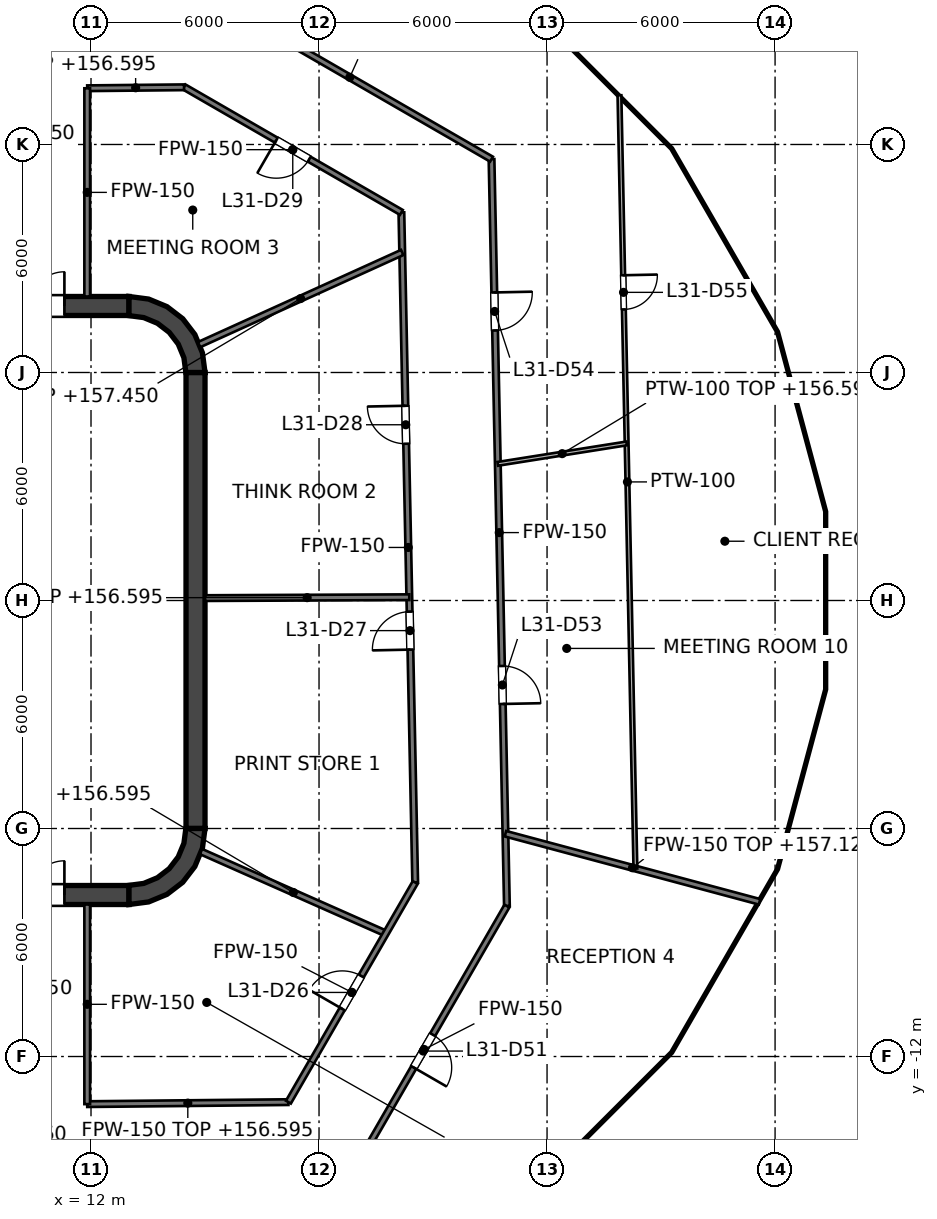
"""IFC4 building model, lengths in metres.
Left out: names, types, materials, properties, quantities, classifications, styles, units other than length and angle.
Written with IfcOpenShell. Run it as: python <this file> out.ifc"""

import sys

from ifc_helpers import new_model, si_unit, direction, frame, frame_2d, origin, place, context, subcontext, project, spatial, polyline, rectangle, outline, extrude, element, fill, save


model = new_model("IFC4")
c1 = context("Model", 3, precision=1e-05, world=origin(), true_north=direction((0.0, 1.0)))
c2 = subcontext(c1, "Body", "Model", "MODEL_VIEW")
j1 = project(units=[si_unit("LENGTHUNIT", "METRE"), si_unit("PLANEANGLEUNIT", "RADIAN")], contexts=[c1])
p1 = place(None, origin())
s1 = spatial("IfcSite", under=j1, at=p1, CompositionType="ELEMENT")
p2 = place(p1, origin())
s2 = spatial("IfcBuilding", under=s1, at=p2, CompositionType="ELEMENT")
p3 = place(p2, frame((0.0, 0.0, 153.6)))
s3 = spatial("IfcBuildingStorey", under=s2, at=p3, CompositionType="ELEMENT", Elevation=153.6)
p4 = place(p3, frame((-13.0, 7.75, 0.0), z_axis=(0.0, 0.0, 1.0), x_axis=(1.0, 0.0, 0.0)))
e1 = element("IfcWall", 1, at=p4, inside=s3, PredefinedType="SHEAR", context=c2, shape_type="SweptSolid", body=[
    extrude(rectangle(XDim=26.0, YDim=0.5, at=frame_2d((13.0, 0.0))), origin(), (0.0, 0.0, 1.0), 4.0),
])
p5 = place(p4, frame((1.7, 0.0, 0.0)))
e2 = element("IfcOpeningElement", 2, at=p5, cuts=e1, PredefinedType="OPENING", context=c2, shape_type="SweptSolid", body=[
    extrude(rectangle(XDim=1.8, YDim=2.1, at=frame_2d((0.9, 1.05))), frame((0.0, 0.25, 0.0), z_axis=(0.0, -1.0, 0.0), x_axis=(1.0, 0.0, 0.0)), (0.0, 0.0, 1.0), 0.5),
])
p6 = place(p4, frame((22.5, 0.0, 0.0)))
e3 = element("IfcOpeningElement", 3, at=p6, cuts=e1, PredefinedType="OPENING", context=c2, shape_type="SweptSolid", body=[
    extrude(rectangle(XDim=1.8, YDim=2.1, at=frame_2d((0.9, 1.05))), frame((0.0, 0.25, 0.0), z_axis=(0.0, -1.0, 0.0), x_axis=(1.0, 0.0, 0.0)), (0.0, 0.0, 1.0), 0.5),
])
p7 = place(p3, frame((-13.0, -7.75, 0.0), z_axis=(0.0, 0.0, 1.0), x_axis=(1.0, 0.0, 0.0)))
e4 = element("IfcWall", 4, at=p7, inside=s3, PredefinedType="SHEAR", context=c2, shape_type="SweptSolid", body=[
    extrude(rectangle(XDim=26.0, YDim=0.5, at=frame_2d((13.0, 0.0))), origin(), (0.0, 0.0, 1.0), 4.0),
])
p8 = place(p7, frame((1.7, 0.0, 0.0)))
e5 = element("IfcOpeningElement", 5, at=p8, cuts=e4, PredefinedType="OPENING", context=c2, shape_type="SweptSolid", body=[
    extrude(rectangle(XDim=1.8, YDim=2.1, at=frame_2d((0.9, 1.05))), frame((0.0, 0.25, 0.0), z_axis=(0.0, -1.0, 0.0), x_axis=(1.0, 0.0, 0.0)), (0.0, 0.0, 1.0), 0.5),
])
p9 = place(p7, frame((22.5, 0.0, 0.0)))
e6 = element("IfcOpeningElement", 6, at=p9, cuts=e4, PredefinedType="OPENING", context=c2, shape_type="SweptSolid", body=[
    extrude(rectangle(XDim=1.8, YDim=2.1, at=frame_2d((0.9, 1.05))), frame((0.0, 0.25, 0.0), z_axis=(0.0, -1.0, 0.0), x_axis=(1.0, 0.0, 0.0)), (0.0, 0.0, 1.0), 0.5),
])
p10 = place(p3, frame((14.75, -6.0, 0.0), z_axis=(0.0, 0.0, 1.0), x_axis=(0.0, 1.0, 0.0)))
e7 = element("IfcWall", 7, at=p10, inside=s3, PredefinedType="SHEAR", context=c2, shape_type="SweptSolid", body=[
    extrude(rectangle(XDim=12.0, YDim=0.5, at=frame_2d((6.0, 0.0))), origin(), (0.0, 0.0, 1.0), 4.0),
])
p11 = place(p3, origin())
e8 = element("IfcWall", 8, at=p11, inside=s3, PredefinedType="SHEAR", context=c2, shape_type="SweptSolid", body=[
    extrude(outline(polyline([(13.0, 8.0), (13.0, 7.496), (13.387, 7.445), (13.748, 7.295), (14.058, 7.058), (14.295, 6.748), (14.445, 6.387), (14.496, 6.0), (15.0, 6.0), (14.932, 6.518), (14.732, 7.0), (14.414, 7.414), (14.0, 7.732), (13.518, 7.932), (13.0, 8.0)])), origin(), (0.0, 0.0, 1.0), 4.0),
])
e9 = element("IfcWall", 9, at=p11, inside=s3, PredefinedType="SHEAR", context=c2, shape_type="SweptSolid", body=[
    extrude(outline(polyline([(15.0, -6.0), (14.496, -6.0), (14.445, -6.387), (14.295, -6.748), (14.058, -7.058), (13.748, -7.295), (13.387, -7.445), (13.0, -7.496), (13.0, -8.0), (13.518, -7.932), (14.0, -7.732), (14.414, -7.414), (14.732, -7.0), (14.932, -6.518), (15.0, -6.0)])), origin(), (0.0, 0.0, 1.0), 4.0),
])
p12 = place(p3, frame((11.8, -7.5, 0.0), z_axis=(0.0, 0.0, 1.0), x_axis=(0.0, 1.0, 0.0)))
e10 = element("IfcWall", 10, at=p12, inside=s3, PredefinedType="SOLIDWALL", context=c2, shape_type="SweptSolid", body=[
    extrude(rectangle(XDim=15.0, YDim=0.4, at=frame_2d((7.5, 0.0))), origin(), (0.0, 0.0, 1.0), 3.85),
])
p13 = place(p12, frame((11.3, 0.0, 0.0)))
e11 = element("IfcOpeningElement", 11, at=p13, cuts=e10, PredefinedType="OPENING", context=c2, shape_type="SweptSolid", body=[
    extrude(rectangle(XDim=1.1, YDim=2.1, at=frame_2d((0.55, 1.05))), frame((0.0, 0.2, 0.0), z_axis=(0.0, -1.0, 0.0), x_axis=(1.0, 0.0, 0.0)), (0.0, 0.0, 1.0), 0.4),
])
p14 = place(p12, frame((8.4, 0.0, 0.0)))
e12 = element("IfcOpeningElement", 12, at=p14, cuts=e10, PredefinedType="OPENING", context=c2, shape_type="SweptSolid", body=[
    extrude(rectangle(XDim=1.1, YDim=2.1, at=frame_2d((0.55, 1.05))), frame((0.0, 0.2, 0.0), z_axis=(0.0, -1.0, 0.0), x_axis=(1.0, 0.0, 0.0)), (0.0, 0.0, 1.0), 0.4),
])
p15 = place(p12, frame((5.5, 0.0, 0.0)))
e13 = element("IfcOpeningElement", 13, at=p15, cuts=e10, PredefinedType="OPENING", context=c2, shape_type="SweptSolid", body=[
    extrude(rectangle(XDim=1.1, YDim=2.1, at=frame_2d((0.55, 1.05))), frame((0.0, 0.2, 0.0), z_axis=(0.0, -1.0, 0.0), x_axis=(1.0, 0.0, 0.0)), (0.0, 0.0, 1.0), 0.4),
])
p16 = place(p12, frame((13.697, 0.0, 0.0)))
e14 = element("IfcOpeningElement", 14, at=p16, cuts=e10, PredefinedType="OPENING", context=c2, shape_type="SweptSolid", body=[
    extrude(rectangle(XDim=0.9, YDim=2.1, at=frame_2d((0.45, 1.05))), frame((0.0, 0.2, 0.0), z_axis=(0.0, -1.0, 0.0), x_axis=(1.0, 0.0, 0.0)), (0.0, 0.0, 1.0), 0.4),
])
p17 = place(p12, frame((0.403, 0.0, 0.0)))
e15 = element("IfcOpeningElement", 15, at=p17, cuts=e10, PredefinedType="OPENING", context=c2, shape_type="SweptSolid", body=[
    extrude(rectangle(XDim=0.9, YDim=2.1, at=frame_2d((0.45, 1.05))), frame((0.0, 0.2, 0.0), z_axis=(0.0, -1.0, 0.0), x_axis=(1.0, 0.0, 0.0)), (0.0, 0.0, 1.0), 0.4),
])
e16 = element("IfcWall", 16, at=p11, inside=s3, PredefinedType="SOLIDWALL", context=c2, shape_type="SweptSolid", body=[
    extrude(outline(polyline([(12.0, -5.675), (12.0, -5.925), (14.25, -5.925), (14.5, -5.925), (14.5, -5.675), (14.5, -3.025), (14.5, -2.775), (14.5, -0.125), (14.5, 0.125), (14.5, 2.775), (14.5, 3.025), (14.5, 5.675), (14.5, 5.925), (14.25, 5.925), (12.0, 5.925), (12.0, 5.675), (14.25, 5.675), (14.25, 3.025), (12.0, 3.025), (12.0, 2.775), (14.25, 2.775), (14.25, 0.125), (12.0, 0.125), (12.0, -0.125), (14.25, -0.125), (14.25, -2.775), (12.0, -2.775), (12.0, -3.025), (14.25, -3.025), (14.25, -5.675), (12.0, -5.675)])), origin(), (0.0, 0.0, 1.0), 3.85),
])
p18 = place(p3, frame((20.167, 10.213, 0.0), z_axis=(0.0, 0.0, 1.0), x_axis=(0.020610894613, -0.999787572949, 0.0)))
e17 = element("IfcWall", 17, at=p18, inside=s3, PredefinedType="PARTITIONING", context=c2, shape_type="SweptSolid", body=[
    extrude(rectangle(XDim=17.637, YDim=0.15, at=frame_2d((8.819, 0.0))), origin(), (0.0, 0.0, 1.0), 2.927),
])
p19 = place(p18, frame((10.508, 0.0, 0.0)))
e18 = element("IfcOpeningElement", 18, at=p19, cuts=e17, PredefinedType="OPENING", context=c2, shape_type="SweptSolid", body=[
    extrude(rectangle(XDim=1.0, YDim=2.1, at=frame_2d((0.5, 1.05))), frame((0.0, 0.075, 0.0), z_axis=(0.0, -1.0, 0.0), x_axis=(1.0, 0.0, 0.0)), (0.0, 0.0, 1.0), 0.15),
])
p20 = place(p18, frame((5.09, 0.0, 0.0)))
e19 = element("IfcOpeningElement", 19, at=p20, cuts=e17, PredefinedType="OPENING", context=c2, shape_type="SweptSolid", body=[
    extrude(rectangle(XDim=1.0, YDim=2.1, at=frame_2d((0.5, 1.05))), frame((0.0, 0.075, 0.0), z_axis=(0.0, -1.0, 0.0), x_axis=(1.0, 0.0, 0.0)), (0.0, 0.0, 1.0), 0.15),
])
p21 = place(p3, frame((22.539, 11.615, 0.0), z_axis=(0.0, 0.0, 1.0), x_axis=(0.020601506683, -0.99978776644, 0.0)))
e20 = element("IfcWall", 20, at=p21, inside=s3, PredefinedType="PARTITIONING", context=c2, shape_type="SweptSolid", body=[
    extrude(rectangle(XDim=19.66, YDim=0.15, at=frame_2d((9.83, 0.0))), origin(), (0.0, 0.0, 1.0), 2.927),
])
p22 = place(p21, frame((13.341, 0.0, 0.0)))
e21 = element("IfcOpeningElement", 21, at=p22, cuts=e20, PredefinedType="OPENING", context=c2, shape_type="SweptSolid", body=[
    extrude(rectangle(XDim=1.0, YDim=2.1, at=frame_2d((0.5, 1.05))), frame((0.0, 0.075, 0.0), z_axis=(0.0, -1.0, 0.0), x_axis=(1.0, 0.0, 0.0)), (0.0, 0.0, 1.0), 0.15),
])
p23 = place(p21, frame((3.51, 0.0, 0.0)))
e22 = element("IfcOpeningElement", 22, at=p23, cuts=e20, PredefinedType="OPENING", context=c2, shape_type="SweptSolid", body=[
    extrude(rectangle(XDim=1.0, YDim=2.1, at=frame_2d((0.5, 1.05))), frame((0.0, 0.075, 0.0), z_axis=(0.0, -1.0, 0.0), x_axis=(1.0, 0.0, 0.0)), (0.0, 0.0, 1.0), 0.15),
])
p24 = place(p3, frame((14.448, 13.515, 0.0), z_axis=(0.0, 0.0, 1.0), x_axis=(0.865975016585, -0.500087263036, 0.0)))
e23 = element("IfcWall", 23, at=p24, inside=s3, PredefinedType="PARTITIONING", context=c2, shape_type="SweptSolid", body=[
    extrude(rectangle(XDim=6.604, YDim=0.15, at=frame_2d((3.302, 0.0))), origin(), (0.0, 0.0, 1.0), 2.927),
])
p25 = place(p24, frame((2.804, 0.0, 0.0)))
e24 = element("IfcOpeningElement", 24, at=p25, cuts=e23, PredefinedType="OPENING", context=c2, shape_type="SweptSolid", body=[
    extrude(rectangle(XDim=1.0, YDim=2.1, at=frame_2d((0.5, 1.05))), frame((0.0, 0.075, 0.0), z_axis=(0.0, -1.0, 0.0), x_axis=(1.0, 0.0, 0.0)), (0.0, 0.0, 1.0), 0.15),
])
p26 = place(p3, frame((15.08, 15.921, 0.0), z_axis=(0.0, 0.0, 1.0), x_axis=(0.865982112089, -0.50007497592, 0.0)))
e25 = element("IfcWall", 25, at=p26, inside=s3, PredefinedType="PARTITIONING", context=c2, shape_type="SweptSolid", body=[
    extrude(rectangle(XDim=8.613, YDim=0.15, at=frame_2d((4.306, 0.0))), origin(), (0.0, 0.0, 1.0), 2.927),
])
p27 = place(p3, frame((14.895, -6.607, 0.0), z_axis=(0.0, 0.0, 1.0), x_axis=(0.914233271379, -0.405188259337, 0.0)))
e26 = element("IfcWall", 26, at=p27, inside=s3, PredefinedType="PARTITIONING", context=c2, shape_type="SweptSolid", body=[
    extrude(rectangle(XDim=5.317, YDim=0.15, at=frame_2d((2.659, 0.0))), origin(), (0.0, 0.0, 1.0), 2.995),
])
p28 = place(p3, frame((22.905, -6.137, 0.0), z_axis=(0.0, 0.0, 1.0), x_axis=(0.965908688021, -0.25888299752, 0.0)))
e27 = element("IfcWall", 27, at=p28, inside=s3, PredefinedType="PARTITIONING", context=c2, shape_type="SweptSolid", body=[
    extrude(rectangle(XDim=6.922, YDim=0.15, at=frame_2d((3.461, 0.0))), origin(), (0.0, 0.0, 1.0), 3.527),
])
p29 = place(p3, frame((15.0, 0.063, 0.0), z_axis=(0.0, 0.0, 1.0), x_axis=(0.999990294223, 0.004405843865, 0.0)))
e28 = element("IfcWall", 28, at=p29, inside=s3, PredefinedType="PARTITIONING", context=c2, shape_type="SweptSolid", body=[
    extrude(rectangle(XDim=5.375, YDim=0.15, at=frame_2d((2.688, 0.0))), origin(), (0.0, 0.0, 1.0), 2.995),
])
p30 = place(p3, frame((11.9, -13.253, 0.0), z_axis=(0.0, 0.0, 1.0), x_axis=(0.999950853109, 0.009914200296, 0.0)))
e29 = element("IfcWall", 29, at=p30, inside=s3, PredefinedType="PARTITIONING", context=c2, shape_type="SweptSolid", body=[
    extrude(rectangle(XDim=5.294, YDim=0.15, at=frame_2d((2.647, 0.0))), origin(), (0.0, 0.0, 1.0), 2.995),
])
p31 = place(p3, frame((11.9, 13.48, 0.0), z_axis=(0.0, 0.0, 1.0), x_axis=(0.999950357576, 0.009964054536, 0.0)))
e30 = element("IfcWall", 30, at=p31, inside=s3, PredefinedType="PARTITIONING", context=c2, shape_type="SweptSolid", body=[
    extrude(rectangle(XDim=2.548, YDim=0.15, at=frame_2d((1.274, 0.0))), origin(), (0.0, 0.0, 1.0), 2.995),
])
p32 = place(p3, frame((14.843, 6.733, 0.0), z_axis=(0.0, 0.0, 1.0), x_axis=(0.910628361306, 0.413226315214, 0.0)))
e31 = element("IfcWall", 31, at=p32, inside=s3, PredefinedType="PARTITIONING", context=c2, shape_type="SweptSolid", body=[
    extrude(rectangle(XDim=5.87, YDim=0.15, at=frame_2d((2.935, 0.0))), origin(), (0.0, 0.0, 1.0), 3.85),
])
p33 = place(p3, frame((18.587, -15.587, 0.0), z_axis=(0.0, 0.0, 1.0), x_axis=(0.500005419212, 0.866022274979, 0.0)))
e32 = element("IfcWall", 32, at=p33, inside=s3, PredefinedType="PARTITIONING", context=c2, shape_type="SweptSolid", body=[
    extrude(rectangle(XDim=8.713, YDim=0.15, at=frame_2d((4.357, 0.0))), origin(), (0.0, 0.0, 1.0), 2.927),
])
p34 = place(p33, frame((3.808, 0.0, 0.0)))
e33 = element("IfcOpeningElement", 33, at=p34, cuts=e32, PredefinedType="OPENING", context=c2, shape_type="SweptSolid", body=[
    extrude(rectangle(XDim=1.0, YDim=2.1, at=frame_2d((0.5, 1.05))), frame((0.0, 0.075, 0.0), z_axis=(0.0, -1.0, 0.0), x_axis=(1.0, 0.0, 0.0)), (0.0, 0.0, 1.0), 0.15),
])
p35 = place(p3, frame((17.194, -13.201, 0.0), z_axis=(0.0, 0.0, 1.0), x_axis=(0.499983182885, 0.866035112932, 0.0)))
e34 = element("IfcWall", 34, at=p35, inside=s3, PredefinedType="PARTITIONING", context=c2, shape_type="SweptSolid", body=[
    extrude(rectangle(XDim=6.674, YDim=0.15, at=frame_2d((3.337, 0.0))), origin(), (0.0, 0.0, 1.0), 2.927),
])
p36 = place(p35, frame((2.834, 0.0, 0.0)))
e35 = element("IfcOpeningElement", 35, at=p36, cuts=e34, PredefinedType="OPENING", context=c2, shape_type="SweptSolid", body=[
    extrude(rectangle(XDim=1.0, YDim=2.1, at=frame_2d((0.5, 1.05))), frame((0.0, 0.075, 0.0), z_axis=(0.0, -1.0, 0.0), x_axis=(1.0, 0.0, 0.0)), (0.0, 0.0, 1.0), 0.15),
])
p37 = place(p3, frame((11.9, -13.253, 0.0), z_axis=(0.0, 0.0, 1.0), x_axis=(0.0, 1.0, 0.0)))
e36 = element("IfcWall", 36, at=p37, inside=s3, PredefinedType="PARTITIONING", context=c2, shape_type="SweptSolid", body=[
    extrude(rectangle(XDim=5.253, YDim=0.15, at=frame_2d((2.626, 0.0))), origin(), (0.0, 0.0, 1.0), 2.927),
])
p38 = place(p3, frame((11.9, 8.0, 0.0), z_axis=(0.0, 0.0, 1.0), x_axis=(0.0, 1.0, 0.0)))
e37 = element("IfcWall", 37, at=p38, inside=s3, PredefinedType="PARTITIONING", context=c2, shape_type="SweptSolid", body=[
    extrude(rectangle(XDim=5.479, YDim=0.15, at=frame_2d((2.74, 0.0))), origin(), (0.0, 0.0, 1.0), 2.927),
])
p39 = place(p3, frame((25.905, 13.295, 0.0), z_axis=(0.0, 0.0, 1.0), x_axis=(0.020631727872, -0.999787143249, 0.0)))
e38 = element("IfcWall", 38, at=p39, inside=s3, PredefinedType="PARTITIONING", context=c2, shape_type="SweptSolid", body=[
    extrude(rectangle(XDim=20.353, YDim=0.1, at=frame_2d((10.177, 0.0))), origin(), (0.0, 0.0, 1.0), 2.927),
])
p40 = place(p39, frame((4.737, 0.0, 0.0)))
e39 = element("IfcOpeningElement", 39, at=p40, cuts=e38, PredefinedType="OPENING", context=c2, shape_type="SweptSolid", body=[
    extrude(rectangle(XDim=0.9, YDim=2.1, at=frame_2d((0.45, 1.05))), frame((0.0, 0.05, 0.0), z_axis=(0.0, -1.0, 0.0), x_axis=(1.0, 0.0, 0.0)), (0.0, 0.0, 1.0), 0.1),
])
p41 = place(p3, frame((22.704, 3.596, 0.0), z_axis=(0.0, 0.0, 1.0), x_axis=(0.987679194201, 0.156492202178, 0.0)))
e40 = element("IfcWall", 40, at=p41, inside=s3, PredefinedType="PARTITIONING", context=c2, shape_type="SweptSolid", body=[
    extrude(rectangle(XDim=3.432, YDim=0.1, at=frame_2d((1.716, 0.0))), origin(), (0.0, 0.0, 1.0), 2.995),
])
p42 = place(p13, origin())
e41 = element("IfcDoor", 41, at=p42, inside=s3, OperationType="DOUBLE_DOOR_SLIDING", PredefinedType="DOOR", context=c2, shape_type="SweptSolid", body=[
    extrude(rectangle(XDim=1.1, YDim=2.1, at=frame_2d((0.55, 1.05))), frame((0.0, 0.025, 0.0), z_axis=(0.0, -1.0, 0.0), x_axis=(1.0, 0.0, 0.0)), (0.0, 0.0, 1.0), 0.05),
])
fill(e11, e41)
p43 = place(p14, origin())
e42 = element("IfcDoor", 42, at=p43, inside=s3, OperationType="DOUBLE_DOOR_SLIDING", PredefinedType="DOOR", context=c2, shape_type="SweptSolid", body=[
    extrude(rectangle(XDim=1.1, YDim=2.1, at=frame_2d((0.55, 1.05))), frame((0.0, 0.025, 0.0), z_axis=(0.0, -1.0, 0.0), x_axis=(1.0, 0.0, 0.0)), (0.0, 0.0, 1.0), 0.05),
])
fill(e12, e42)
p44 = place(p15, origin())
e43 = element("IfcDoor", 43, at=p44, inside=s3, OperationType="DOUBLE_DOOR_SLIDING", PredefinedType="DOOR", context=c2, shape_type="SweptSolid", body=[
    extrude(rectangle(XDim=1.1, YDim=2.1, at=frame_2d((0.55, 1.05))), frame((0.0, 0.025, 0.0), z_axis=(0.0, -1.0, 0.0), x_axis=(1.0, 0.0, 0.0)), (0.0, 0.0, 1.0), 0.05),
])
fill(e13, e43)
p45 = place(p16, origin())
e44 = element("IfcDoor", 44, at=p45, inside=s3, OperationType="SINGLE_SWING_RIGHT", PredefinedType="DOOR", context=c2, shape_type="SweptSolid", body=[
    extrude(rectangle(XDim=0.9, YDim=2.1, at=frame_2d((0.45, 1.05))), frame((0.0, 0.025, 0.0), z_axis=(0.0, -1.0, 0.0), x_axis=(1.0, 0.0, 0.0)), (0.0, 0.0, 1.0), 0.05),
])
fill(e14, e44)
p46 = place(p17, origin())
e45 = element("IfcDoor", 45, at=p46, inside=s3, OperationType="SINGLE_SWING_RIGHT", PredefinedType="DOOR", context=c2, shape_type="SweptSolid", body=[
    extrude(rectangle(XDim=0.9, YDim=2.1, at=frame_2d((0.45, 1.05))), frame((0.0, 0.025, 0.0), z_axis=(0.0, -1.0, 0.0), x_axis=(1.0, 0.0, 0.0)), (0.0, 0.0, 1.0), 0.05),
])
fill(e15, e45)
p47 = place(p6, origin())
e46 = element("IfcDoor", 46, at=p47, inside=s3, OperationType="DOUBLE_DOOR_SINGLE_SWING", PredefinedType="DOOR", context=c2, shape_type="SweptSolid", body=[
    extrude(rectangle(XDim=1.8, YDim=2.1, at=frame_2d((0.9, 1.05))), frame((0.0, 0.025, 0.0), z_axis=(0.0, -1.0, 0.0), x_axis=(1.0, 0.0, 0.0)), (0.0, 0.0, 1.0), 0.05),
])
fill(e3, e46)
p48 = place(p9, origin())
e47 = element("IfcDoor", 47, at=p48, inside=s3, OperationType="DOUBLE_DOOR_SINGLE_SWING", PredefinedType="DOOR", context=c2, shape_type="SweptSolid", body=[
    extrude(rectangle(XDim=1.8, YDim=2.1, at=frame_2d((0.9, 1.05))), frame((0.0, 0.025, 0.0), z_axis=(0.0, -1.0, 0.0), x_axis=(1.0, 0.0, 0.0)), (0.0, 0.0, 1.0), 0.05),
])
fill(e6, e47)
p49 = place(p36, origin())
e48 = element("IfcDoor", 48, at=p49, inside=s3, OperationType="SINGLE_SWING_LEFT", PredefinedType="DOOR", context=c2, shape_type="SweptSolid", body=[
    extrude(rectangle(XDim=1.0, YDim=2.1, at=frame_2d((0.5, 1.05))), frame((0.0, 0.025, 0.0), z_axis=(0.0, -1.0, 0.0), x_axis=(1.0, 0.0, 0.0)), (0.0, 0.0, 1.0), 0.05),
])
fill(e35, e48)
p50 = place(p19, origin())
e49 = element("IfcDoor", 49, at=p50, inside=s3, OperationType="SINGLE_SWING_RIGHT", PredefinedType="DOOR", context=c2, shape_type="SweptSolid", body=[
    extrude(rectangle(XDim=1.0, YDim=2.1, at=frame_2d((0.5, 1.05))), frame((0.0, 0.025, 0.0), z_axis=(0.0, -1.0, 0.0), x_axis=(1.0, 0.0, 0.0)), (0.0, 0.0, 1.0), 0.05),
])
fill(e18, e49)
p51 = place(p20, origin())
e50 = element("IfcDoor", 50, at=p51, inside=s3, OperationType="SINGLE_SWING_LEFT", PredefinedType="DOOR", context=c2, shape_type="SweptSolid", body=[
    extrude(rectangle(XDim=1.0, YDim=2.1, at=frame_2d((0.5, 1.05))), frame((0.0, 0.025, 0.0), z_axis=(0.0, -1.0, 0.0), x_axis=(1.0, 0.0, 0.0)), (0.0, 0.0, 1.0), 0.05),
])
fill(e19, e50)
p52 = place(p25, origin())
e51 = element("IfcDoor", 51, at=p52, inside=s3, OperationType="SINGLE_SWING_LEFT", PredefinedType="DOOR", context=c2, shape_type="SweptSolid", body=[
    extrude(rectangle(XDim=1.0, YDim=2.1, at=frame_2d((0.5, 1.05))), frame((0.0, 0.025, 0.0), z_axis=(0.0, -1.0, 0.0), x_axis=(1.0, 0.0, 0.0)), (0.0, 0.0, 1.0), 0.05),
])
fill(e24, e51)
p53 = place(p34, origin())
e52 = element("IfcDoor", 52, at=p53, inside=s3, OperationType="SINGLE_SWING_LEFT", PredefinedType="DOOR", context=c2, shape_type="SweptSolid", body=[
    extrude(rectangle(XDim=1.0, YDim=2.1, at=frame_2d((0.5, 1.05))), frame((0.0, 0.025, 0.0), z_axis=(0.0, -1.0, 0.0), x_axis=(1.0, 0.0, 0.0)), (0.0, 0.0, 1.0), 0.05),
])
fill(e33, e52)
p54 = place(p22, origin())
e53 = element("IfcDoor", 53, at=p54, inside=s3, OperationType="SINGLE_SWING_RIGHT", PredefinedType="DOOR", context=c2, shape_type="SweptSolid", body=[
    extrude(rectangle(XDim=1.0, YDim=2.1, at=frame_2d((0.5, 1.05))), frame((0.0, 0.025, 0.0), z_axis=(0.0, -1.0, 0.0), x_axis=(1.0, 0.0, 0.0)), (0.0, 0.0, 1.0), 0.05),
])
fill(e21, e53)
p55 = place(p23, origin())
e54 = element("IfcDoor", 54, at=p55, inside=s3, OperationType="SINGLE_SWING_LEFT", PredefinedType="DOOR", context=c2, shape_type="SweptSolid", body=[
    extrude(rectangle(XDim=1.0, YDim=2.1, at=frame_2d((0.5, 1.05))), frame((0.0, 0.025, 0.0), z_axis=(0.0, -1.0, 0.0), x_axis=(1.0, 0.0, 0.0)), (0.0, 0.0, 1.0), 0.05),
])
fill(e22, e54)
p56 = place(p40, origin())
e55 = element("IfcDoor", 55, at=p56, inside=s3, OperationType="SINGLE_SWING_LEFT", PredefinedType="DOOR", context=c2, shape_type="SweptSolid", body=[
    extrude(rectangle(XDim=0.9, YDim=2.1, at=frame_2d((0.45, 1.05))), frame((0.0, 0.025, 0.0), z_axis=(0.0, -1.0, 0.0), x_axis=(1.0, 0.0, 0.0)), (0.0, 0.0, 1.0), 0.05),
])
fill(e39, e55)
save(model, sys.argv[1])
